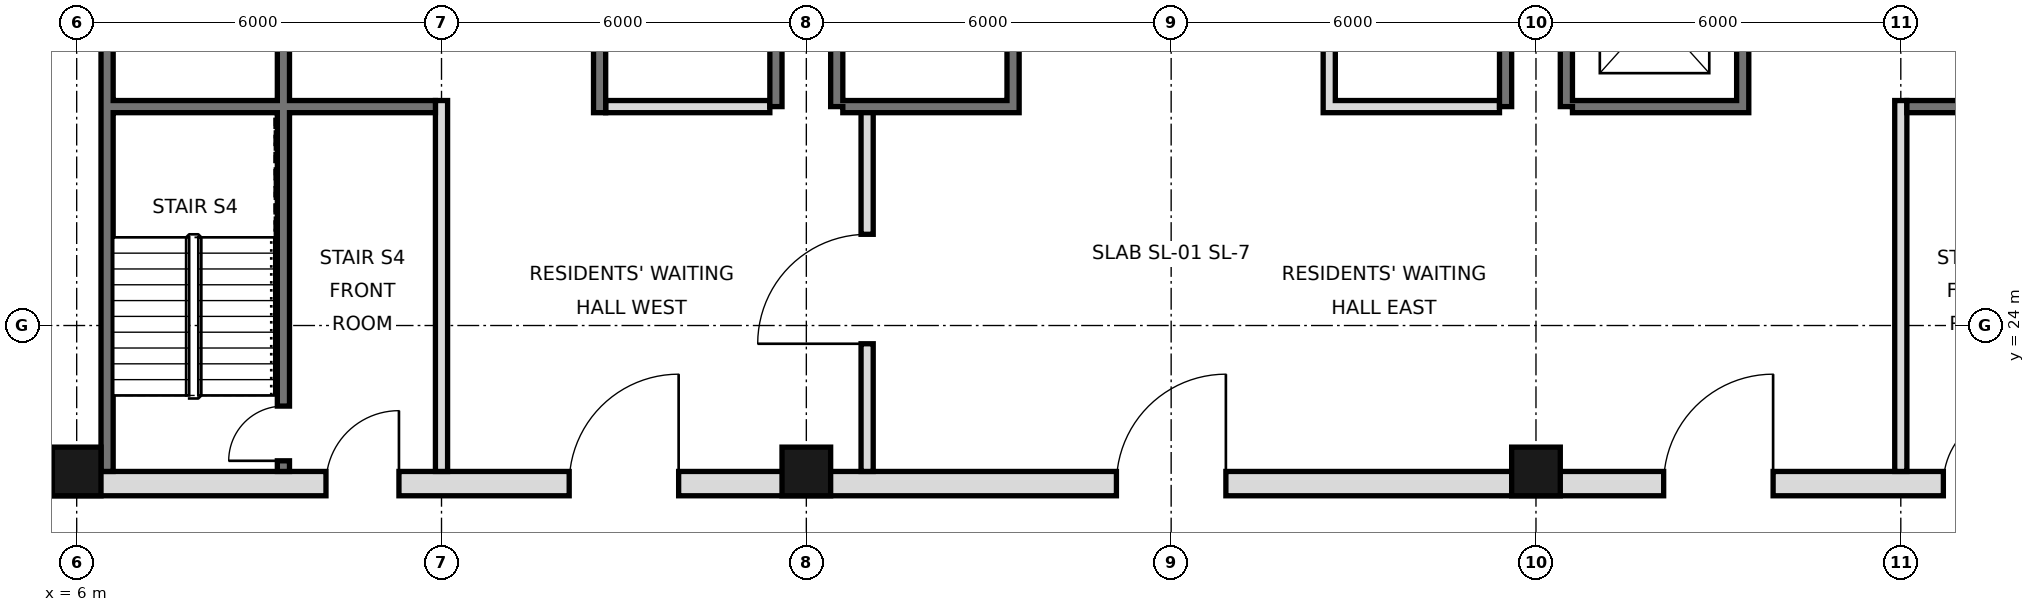
"""IFC4 building model, lengths in metres.
Left out: names, types, materials, properties, quantities, classifications, styles, units other than length and angle.
Written with IfcOpenShell. Run it as: python <this file> out.ifc"""

import sys

from ifc_helpers import new_model, si_unit, direction, frame, frame_2d, origin, origin_2d, place, context, subcontext, project, spatial, rectangle, hollow_rectangle, extrude, element, fill, save


model = new_model("IFC4")
c1 = context("Model", 3, precision=1e-05, world=origin(), true_north=direction((0.0, 1.0)))
c2 = subcontext(c1, "Body", "Model", "MODEL_VIEW")
j1 = project(units=[si_unit("LENGTHUNIT", "METRE"), si_unit("PLANEANGLEUNIT", "RADIAN")], contexts=[c1])
p1 = place(None, origin())
s1 = spatial("IfcSite", under=j1, at=p1, CompositionType="ELEMENT")
p2 = place(p1, origin())
s2 = spatial("IfcBuilding", under=s1, at=p2, CompositionType="ELEMENT")
p3 = place(p2, frame((0.0, 0.0, 206.4)))
s3 = spatial("IfcBuildingStorey", under=s2, at=p3, CompositionType="ELEMENT", Elevation=206.4)
for number, where, z_axis, x_axis in (
    (1, (6.0, 21.6, 0.0), (0.0, 0.0, 1.0), (1.0, 0.0, 0.0)),
    (2, (18.0, 21.6, 0.0), (0.0, 0.0, 1.0), (1.0, 0.0, 0.0)),
    (3, (30.0, 21.6, 0.0), (0.0, 0.0, 1.0), (1.0, 0.0, 0.0)),
):
    element("IfcColumn", number, at=place(p3, frame(where, z_axis=z_axis, x_axis=x_axis)), inside=s3, PredefinedType="COLUMN", context=c2, shape_type="SweptSolid", body=[
        extrude(hollow_rectangle(XDim=0.8, YDim=0.8, WallThickness=0.04, at=origin_2d()), origin(), (0.0, 0.0, 1.0), 3.6),
    ])
p4 = place(p3, frame((6.5, 21.6, 0.0), z_axis=(0.0, 0.0, 1.0), x_axis=(0.0, 1.0, 0.0)))
e4 = element("IfcWall", 4, at=p4, inside=s3, PredefinedType="SOLIDWALL", context=c2, shape_type="SweptSolid", body=[
    extrude(rectangle(XDim=23.5, YDim=0.2, at=frame_2d((11.75, 0.0))), origin(), (0.0, 0.0, 1.0), 3.38),
])
for number, where, z_axis, x_axis in (
    (5, (17.5, 27.6, 0.0), (0.0, 0.0, 1.0), (0.0, 1.0, 0.0)),
    (6, (18.5, 27.6, 0.0), (0.0, 0.0, 1.0), (0.0, 1.0, 0.0)),
    (7, (29.5, 27.6, 0.0), (0.0, 0.0, 1.0), (0.0, 1.0, 0.0)),
    (8, (30.5, 27.6, 0.0), (0.0, 0.0, 1.0), (0.0, 1.0, 0.0)),
):
    element("IfcWall", number, at=place(p3, frame(where, z_axis=z_axis, x_axis=x_axis)), inside=s3, PredefinedType="SOLIDWALL", context=c2, shape_type="SweptSolid", body=[
        extrude(rectangle(XDim=17.5, YDim=0.2, at=frame_2d((8.75, 0.0))), origin(), (0.0, 0.0, 1.0), 3.38),
    ])
p5 = place(p3, frame((5.6, 21.4, 0.0), z_axis=(0.0, 0.0, 1.0), x_axis=(1.0, 0.0, 0.0)))
e9 = element("IfcWall", 9, at=p5, inside=s3, PredefinedType="SOLIDWALL", context=c2, shape_type="SweptSolid", body=[
    extrude(rectangle(XDim=36.8, YDim=0.4, at=frame_2d((18.4, 0.0))), origin(), (0.0, 0.0, 1.0), 3.38),
])
p6 = place(p5, frame((8.5, 0.0, 0.0)))
e10 = element("IfcOpeningElement", 10, at=p6, cuts=e9, PredefinedType="OPENING", context=c2, shape_type="SweptSolid", body=[
    extrude(rectangle(XDim=1.8, YDim=2.1, at=frame_2d((0.9, 1.05))), frame((0.0, 0.21, 0.0), z_axis=(0.0, -1.0, 0.0), x_axis=(1.0, 0.0, 0.0)), (0.0, 0.0, 1.0), 0.42),
])
p7 = place(p5, frame((17.5, 0.0, 0.0)))
e11 = element("IfcOpeningElement", 11, at=p7, cuts=e9, PredefinedType="OPENING", context=c2, shape_type="SweptSolid", body=[
    extrude(rectangle(XDim=1.8, YDim=2.1, at=frame_2d((0.9, 1.05))), frame((0.0, 0.21, 0.0), z_axis=(0.0, -1.0, 0.0), x_axis=(1.0, 0.0, 0.0)), (0.0, 0.0, 1.0), 0.42),
])
p8 = place(p5, frame((26.5, 0.0, 0.0)))
e12 = element("IfcOpeningElement", 12, at=p8, cuts=e9, PredefinedType="OPENING", context=c2, shape_type="SweptSolid", body=[
    extrude(rectangle(XDim=1.8, YDim=2.1, at=frame_2d((0.9, 1.05))), frame((0.0, 0.21, 0.0), z_axis=(0.0, -1.0, 0.0), x_axis=(1.0, 0.0, 0.0)), (0.0, 0.0, 1.0), 0.42),
])
p9 = place(p5, frame((4.5, 0.0, 0.0)))
e13 = element("IfcOpeningElement", 13, at=p9, cuts=e9, PredefinedType="OPENING", context=c2, shape_type="SweptSolid", body=[
    extrude(rectangle(XDim=1.2, YDim=2.1, at=frame_2d((0.6, 1.05))), frame((0.0, 0.21, 0.0), z_axis=(0.0, -1.0, 0.0), x_axis=(1.0, 0.0, 0.0)), (0.0, 0.0, 1.0), 0.42),
])
p10 = place(p5, frame((31.1, 0.0, 0.0)))
e14 = element("IfcOpeningElement", 14, at=p10, cuts=e9, PredefinedType="OPENING", context=c2, shape_type="SweptSolid", body=[
    extrude(rectangle(XDim=1.2, YDim=2.1, at=frame_2d((0.6, 1.05))), frame((0.0, 0.21, 0.0), z_axis=(0.0, -1.0, 0.0), x_axis=(1.0, 0.0, 0.0)), (0.0, 0.0, 1.0), 0.42),
])
p11 = place(p3, frame((19.0, 21.6, 0.0), z_axis=(0.0, 0.0, 1.0), x_axis=(0.0, 1.0, 0.0)))
e15 = element("IfcWall", 15, at=p11, inside=s3, PredefinedType="PARTITIONING", context=c2, shape_type="SweptSolid", body=[
    extrude(rectangle(XDim=6.0, YDim=0.2, at=frame_2d((3.0, 0.0))), origin(), (0.0, 0.0, 1.0), 3.38),
])
p12 = place(p11, frame((2.1, 0.0, 0.0)))
e16 = element("IfcOpeningElement", 16, at=p12, cuts=e15, PredefinedType="OPENING", context=c2, shape_type="SweptSolid", body=[
    extrude(rectangle(XDim=1.8, YDim=2.1, at=frame_2d((0.9, 1.05))), frame((0.0, 0.11, 0.0), z_axis=(0.0, -1.0, 0.0), x_axis=(1.0, 0.0, 0.0)), (0.0, 0.0, 1.0), 0.22),
])
p13 = place(p3, frame((12.0, 21.6, 0.0), z_axis=(0.0, 0.0, 1.0), x_axis=(0.0, 1.0, 0.0)))
e17 = element("IfcWall", 17, at=p13, inside=s3, PredefinedType="PARTITIONING", context=c2, shape_type="SweptSolid", body=[
    extrude(rectangle(XDim=6.1, YDim=0.2, at=frame_2d((3.05, 0.0))), origin(), (0.0, 0.0, 1.0), 3.38),
])
p14 = place(p3, frame((14.6, 27.5, 0.0), z_axis=(0.0, 0.0, 1.0), x_axis=(0.0, 1.0, 0.0)))
e18 = element("IfcWall", 18, at=p14, inside=s3, PredefinedType="SOLIDWALL", context=c2, shape_type="SweptSolid", body=[
    extrude(rectangle(XDim=17.5, YDim=0.2, at=frame_2d((8.75, 0.0))), origin(), (0.0, 0.0, 1.0), 3.38),
])
p15 = place(p14, frame((15.4, 0.0, 0.0)))
e19 = element("IfcOpeningElement", 19, at=p15, cuts=e18, PredefinedType="OPENING", context=c2, shape_type="SweptSolid", body=[
    extrude(rectangle(XDim=1.1, YDim=2.1, at=frame_2d((0.55, 1.05))), frame((0.0, 0.11, 0.0), z_axis=(0.0, -1.0, 0.0), x_axis=(1.0, 0.0, 0.0)), (0.0, 0.0, 1.0), 0.22),
])
p16 = place(p14, frame((2.7, 0.0, 0.0)))
e20 = element("IfcOpeningElement", 20, at=p16, cuts=e18, PredefinedType="OPENING", context=c2, shape_type="SweptSolid", body=[
    extrude(rectangle(XDim=1.0, YDim=2.1, at=frame_2d((0.5, 1.05))), frame((0.0, 0.11, 0.0), z_axis=(0.0, -1.0, 0.0), x_axis=(1.0, 0.0, 0.0)), (0.0, 0.0, 1.0), 0.22),
])
p17 = place(p14, frame((9.9, 0.0, 0.0)))
e21 = element("IfcOpeningElement", 21, at=p17, cuts=e18, PredefinedType="OPENING", context=c2, shape_type="SweptSolid", body=[
    extrude(rectangle(XDim=0.9, YDim=2.1, at=frame_2d((0.45, 1.05))), frame((0.0, 0.11, 0.0), z_axis=(0.0, -1.0, 0.0), x_axis=(1.0, 0.0, 0.0)), (0.0, 0.0, 1.0), 0.22),
])
p18 = place(p3, frame((21.4, 27.5, 0.0), z_axis=(0.0, 0.0, 1.0), x_axis=(0.0, 1.0, 0.0)))
e22 = element("IfcWall", 22, at=p18, inside=s3, PredefinedType="SOLIDWALL", context=c2, shape_type="SweptSolid", body=[
    extrude(rectangle(XDim=17.5, YDim=0.2, at=frame_2d((8.75, 0.0))), origin(), (0.0, 0.0, 1.0), 3.38),
])
p19 = place(p18, frame((16.2, 0.0, 0.0)))
e23 = element("IfcOpeningElement", 23, at=p19, cuts=e22, PredefinedType="OPENING", context=c2, shape_type="SweptSolid", body=[
    extrude(rectangle(XDim=1.0, YDim=2.1, at=frame_2d((0.5, 1.05))), frame((0.0, 0.11, 0.0), z_axis=(0.0, -1.0, 0.0), x_axis=(1.0, 0.0, 0.0)), (0.0, 0.0, 1.0), 0.22),
])
p20 = place(p18, frame((7.4, 0.0, 0.0)))
e24 = element("IfcOpeningElement", 24, at=p20, cuts=e22, PredefinedType="OPENING", context=c2, shape_type="SweptSolid", body=[
    extrude(rectangle(XDim=0.9, YDim=2.1, at=frame_2d((0.45, 1.05))), frame((0.0, 0.11, 0.0), z_axis=(0.0, -1.0, 0.0), x_axis=(1.0, 0.0, 0.0)), (0.0, 0.0, 1.0), 0.22),
])
p21 = place(p3, frame((26.6, 27.5, 0.0), z_axis=(0.0, 0.0, 1.0), x_axis=(0.0, 1.0, 0.0)))
e25 = element("IfcWall", 25, at=p21, inside=s3, PredefinedType="SOLIDWALL", context=c2, shape_type="SweptSolid", body=[
    extrude(rectangle(XDim=17.5, YDim=0.2, at=frame_2d((8.75, 0.0))), origin(), (0.0, 0.0, 1.0), 3.38),
])
p22 = place(p21, frame((4.3, 0.0, 0.0)))
e26 = element("IfcOpeningElement", 26, at=p22, cuts=e25, PredefinedType="OPENING", context=c2, shape_type="SweptSolid", body=[
    extrude(rectangle(XDim=0.9, YDim=2.1, at=frame_2d((0.45, 1.05))), frame((0.0, 0.11, 0.0), z_axis=(0.0, -1.0, 0.0), x_axis=(1.0, 0.0, 0.0)), (0.0, 0.0, 1.0), 0.22),
])
p23 = place(p21, frame((10.35, 0.0, 0.0)))
e27 = element("IfcOpeningElement", 27, at=p23, cuts=e25, PredefinedType="OPENING", context=c2, shape_type="SweptSolid", body=[
    extrude(rectangle(XDim=1.0, YDim=2.1, at=frame_2d((0.5, 1.05))), frame((0.0, 0.11, 0.0), z_axis=(0.0, -1.0, 0.0), x_axis=(1.0, 0.0, 0.0)), (0.0, 0.0, 1.0), 0.22),
])
p24 = place(p3, frame((33.4, 27.5, 0.0), z_axis=(0.0, 0.0, 1.0), x_axis=(0.0, 1.0, 0.0)))
e28 = element("IfcWall", 28, at=p24, inside=s3, PredefinedType="SOLIDWALL", context=c2, shape_type="SweptSolid", body=[
    extrude(rectangle(XDim=17.5, YDim=0.2, at=frame_2d((8.75, 0.0))), origin(), (0.0, 0.0, 1.0), 3.38),
])
p25 = place(p24, frame((1.1, 0.0, 0.0)))
e29 = element("IfcOpeningElement", 29, at=p25, cuts=e28, PredefinedType="OPENING", context=c2, shape_type="SweptSolid", body=[
    extrude(rectangle(XDim=1.1, YDim=2.1, at=frame_2d((0.55, 1.05))), frame((0.0, 0.11, 0.0), z_axis=(0.0, -1.0, 0.0), x_axis=(1.0, 0.0, 0.0)), (0.0, 0.0, 1.0), 0.22),
])
p26 = place(p24, frame((4.2, 0.0, 0.0)))
e30 = element("IfcOpeningElement", 30, at=p26, cuts=e28, PredefinedType="OPENING", context=c2, shape_type="SweptSolid", body=[
    extrude(rectangle(XDim=1.1, YDim=2.1, at=frame_2d((0.55, 1.05))), frame((0.0, 0.11, 0.0), z_axis=(0.0, -1.0, 0.0), x_axis=(1.0, 0.0, 0.0)), (0.0, 0.0, 1.0), 0.22),
])
p27 = place(p24, frame((15.4, 0.0, 0.0)))
e31 = element("IfcOpeningElement", 31, at=p27, cuts=e28, PredefinedType="OPENING", context=c2, shape_type="SweptSolid", body=[
    extrude(rectangle(XDim=1.1, YDim=2.1, at=frame_2d((0.55, 1.05))), frame((0.0, 0.11, 0.0), z_axis=(0.0, -1.0, 0.0), x_axis=(1.0, 0.0, 0.0)), (0.0, 0.0, 1.0), 0.22),
])
p28 = place(p24, frame((9.9, 0.0, 0.0)))
e32 = element("IfcOpeningElement", 32, at=p28, cuts=e28, PredefinedType="OPENING", context=c2, shape_type="SweptSolid", body=[
    extrude(rectangle(XDim=0.9, YDim=2.1, at=frame_2d((0.45, 1.05))), frame((0.0, 0.11, 0.0), z_axis=(0.0, -1.0, 0.0), x_axis=(1.0, 0.0, 0.0)), (0.0, 0.0, 1.0), 0.22),
])
p29 = place(p3, frame((36.0, 21.6, 0.0), z_axis=(0.0, 0.0, 1.0), x_axis=(0.0, 1.0, 0.0)))
e33 = element("IfcWall", 33, at=p29, inside=s3, PredefinedType="PARTITIONING", context=c2, shape_type="SweptSolid", body=[
    extrude(rectangle(XDim=6.1, YDim=0.2, at=frame_2d((3.05, 0.0))), origin(), (0.0, 0.0, 1.0), 3.38),
])
p30 = place(p3, frame((9.4, 21.6, 0.0), z_axis=(0.0, 0.0, 1.0), x_axis=(0.0, 1.0, 0.0)))
e34 = element("IfcWall", 34, at=p30, inside=s3, PredefinedType="SOLIDWALL", context=c2, shape_type="SweptSolid", body=[
    extrude(rectangle(XDim=23.4, YDim=0.2, at=frame_2d((11.7, 0.0))), origin(), (0.0, 0.0, 1.0), 3.38),
])
p31 = place(p30, frame((7.95, 0.0, 0.0)))
e35 = element("IfcOpeningElement", 35, at=p31, cuts=e34, PredefinedType="OPENING", context=c2, shape_type="SweptSolid", body=[
    extrude(rectangle(XDim=1.0, YDim=2.1, at=frame_2d((0.5, 1.05))), frame((0.0, 0.11, 0.0), z_axis=(0.0, -1.0, 0.0), x_axis=(1.0, 0.0, 0.0)), (0.0, 0.0, 1.0), 0.22),
])
p32 = place(p30, frame((12.6, 0.0, 0.0)))
e36 = element("IfcOpeningElement", 36, at=p32, cuts=e34, PredefinedType="OPENING", context=c2, shape_type="SweptSolid", body=[
    extrude(rectangle(XDim=1.0, YDim=2.1, at=frame_2d((0.5, 1.05))), frame((0.0, 0.11, 0.0), z_axis=(0.0, -1.0, 0.0), x_axis=(1.0, 0.0, 0.0)), (0.0, 0.0, 1.0), 0.22),
])
p33 = place(p30, frame((22.1, 0.0, 0.0)))
e37 = element("IfcOpeningElement", 37, at=p33, cuts=e34, PredefinedType="OPENING", context=c2, shape_type="SweptSolid", body=[
    extrude(rectangle(XDim=1.0, YDim=2.1, at=frame_2d((0.5, 1.05))), frame((0.0, 0.11, 0.0), z_axis=(0.0, -1.0, 0.0), x_axis=(1.0, 0.0, 0.0)), (0.0, 0.0, 1.0), 0.22),
])
p34 = place(p30, frame((0.175, 0.0, 0.0)))
e38 = element("IfcOpeningElement", 38, at=p34, cuts=e34, PredefinedType="OPENING", context=c2, shape_type="SweptSolid", body=[
    extrude(rectangle(XDim=0.9, YDim=2.1, at=frame_2d((0.45, 1.05))), frame((0.0, 0.11, 0.0), z_axis=(0.0, -1.0, 0.0), x_axis=(1.0, 0.0, 0.0)), (0.0, 0.0, 1.0), 0.22),
])
p35 = place(p3, frame((14.7, 27.6, 0.0), z_axis=(0.0, 0.0, 1.0), x_axis=(1.0, 0.0, 0.0)))
e39 = element("IfcWall", 39, at=p35, inside=s3, PredefinedType="PARTITIONING", context=c2, shape_type="SweptSolid", body=[
    extrude(rectangle(XDim=2.7, YDim=0.2, at=frame_2d((1.35, 0.0))), origin(), (0.0, 0.0, 1.0), 3.38),
])
for number, where, z_axis, x_axis in (
    (40, (18.6, 27.6, 0.0), (0.0, 0.0, 1.0), (1.0, 0.0, 0.0)),
    (41, (26.7, 27.6, 0.0), (0.0, 0.0, 1.0), (1.0, 0.0, 0.0)),
    (42, (30.6, 27.6, 0.0), (0.0, 0.0, 1.0), (1.0, 0.0, 0.0)),
):
    element("IfcWall", number, at=place(p3, frame(where, z_axis=z_axis, x_axis=x_axis)), inside=s3, PredefinedType="SOLIDWALL", context=c2, shape_type="SweptSolid", body=[
        extrude(rectangle(XDim=2.7, YDim=0.2, at=frame_2d((1.35, 0.0))), origin(), (0.0, 0.0, 1.0), 3.38),
    ])
for number, where, z_axis, x_axis in (
    (43, (36.1, 27.6, 0.0), (0.0, 0.0, 1.0), (1.0, 0.0, 0.0)),
    (44, (6.6, 27.6, 0.0), (0.0, 0.0, 1.0), (1.0, 0.0, 0.0)),
):
    element("IfcWall", number, at=place(p3, frame(where, z_axis=z_axis, x_axis=x_axis)), inside=s3, PredefinedType="SOLIDWALL", context=c2, shape_type="SweptSolid", body=[
        extrude(rectangle(XDim=5.3, YDim=0.2, at=frame_2d((2.65, 0.0))), origin(), (0.0, 0.0, 1.0), 3.38),
    ])
p36 = place(p6, frame((1.8, 0.0, 0.0), z_axis=(0.0, 0.0, 1.0), x_axis=(-1.0, 0.0, 0.0)))
e45 = element("IfcDoor", 45, at=p36, inside=s3, OperationType="SINGLE_SWING_LEFT", PredefinedType="DOOR", context=c2, shape_type="SweptSolid", body=[
    extrude(rectangle(XDim=1.8, YDim=2.1, at=frame_2d((0.9, 1.05))), frame((0.0, 0.025, 0.0), z_axis=(0.0, -1.0, 0.0), x_axis=(1.0, 0.0, 0.0)), (0.0, 0.0, 1.0), 0.05),
])
fill(e10, e45)
p37 = place(p12, origin())
e46 = element("IfcDoor", 46, at=p37, inside=s3, OperationType="SINGLE_SWING_LEFT", PredefinedType="DOOR", context=c2, shape_type="SweptSolid", body=[
    extrude(rectangle(XDim=1.8, YDim=2.1, at=frame_2d((0.9, 1.05))), frame((0.0, 0.025, 0.0), z_axis=(0.0, -1.0, 0.0), x_axis=(1.0, 0.0, 0.0)), (0.0, 0.0, 1.0), 0.05),
])
fill(e16, e46)
p38 = place(p7, frame((1.8, 0.0, 0.0), z_axis=(0.0, 0.0, 1.0), x_axis=(-1.0, 0.0, 0.0)))
e47 = element("IfcDoor", 47, at=p38, inside=s3, OperationType="SINGLE_SWING_LEFT", PredefinedType="DOOR", context=c2, shape_type="SweptSolid", body=[
    extrude(rectangle(XDim=1.8, YDim=2.1, at=frame_2d((0.9, 1.05))), frame((0.0, 0.025, 0.0), z_axis=(0.0, -1.0, 0.0), x_axis=(1.0, 0.0, 0.0)), (0.0, 0.0, 1.0), 0.05),
])
fill(e11, e47)
p39 = place(p8, frame((1.8, 0.0, 0.0), z_axis=(0.0, 0.0, 1.0), x_axis=(-1.0, 0.0, 0.0)))
e48 = element("IfcDoor", 48, at=p39, inside=s3, OperationType="SINGLE_SWING_LEFT", PredefinedType="DOOR", context=c2, shape_type="SweptSolid", body=[
    extrude(rectangle(XDim=1.8, YDim=2.1, at=frame_2d((0.9, 1.05))), frame((0.0, 0.025, 0.0), z_axis=(0.0, -1.0, 0.0), x_axis=(1.0, 0.0, 0.0)), (0.0, 0.0, 1.0), 0.05),
])
fill(e12, e48)
p40 = place(p9, frame((1.2, 0.0, 0.0), z_axis=(0.0, 0.0, 1.0), x_axis=(-1.0, 0.0, 0.0)))
e49 = element("IfcDoor", 49, at=p40, inside=s3, OperationType="SINGLE_SWING_LEFT", PredefinedType="DOOR", context=c2, shape_type="SweptSolid", body=[
    extrude(rectangle(XDim=1.2, YDim=2.1, at=frame_2d((0.6, 1.05))), frame((0.0, 0.025, 0.0), z_axis=(0.0, -1.0, 0.0), x_axis=(1.0, 0.0, 0.0)), (0.0, 0.0, 1.0), 0.05),
])
fill(e13, e49)
p41 = place(p10, frame((1.2, 0.0, 0.0), z_axis=(0.0, 0.0, 1.0), x_axis=(-1.0, 0.0, 0.0)))
e50 = element("IfcDoor", 50, at=p41, inside=s3, OperationType="SINGLE_SWING_LEFT", PredefinedType="DOOR", context=c2, shape_type="SweptSolid", body=[
    extrude(rectangle(XDim=1.2, YDim=2.1, at=frame_2d((0.6, 1.05))), frame((0.0, 0.025, 0.0), z_axis=(0.0, -1.0, 0.0), x_axis=(1.0, 0.0, 0.0)), (0.0, 0.0, 1.0), 0.05),
])
fill(e14, e50)
p42 = place(p34, origin())
e51 = element("IfcDoor", 51, at=p42, inside=s3, OperationType="SINGLE_SWING_LEFT", PredefinedType="DOOR", context=c2, shape_type="SweptSolid", body=[
    extrude(rectangle(XDim=0.9, YDim=2.1, at=frame_2d((0.45, 1.05))), frame((0.0, 0.025, 0.0), z_axis=(0.0, -1.0, 0.0), x_axis=(1.0, 0.0, 0.0)), (0.0, 0.0, 1.0), 0.05),
])
fill(e38, e51)
save(model, sys.argv[1])
